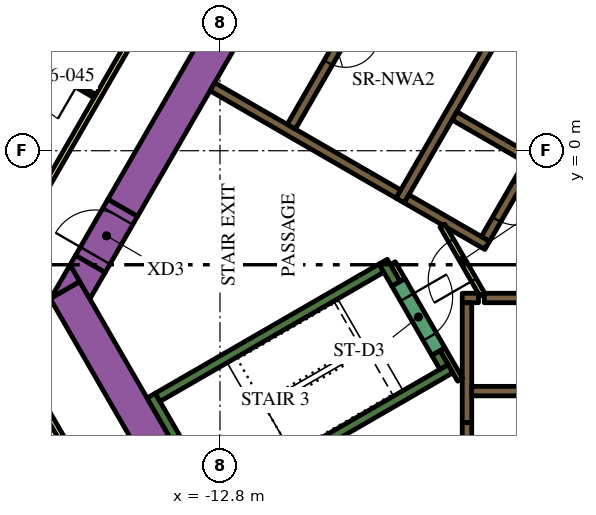
"""IFC4 building model, lengths in metres.
Left out: names, types, materials, properties, quantities, classifications, styles, units other than length and angle.
Written with IfcOpenShell. Run it as: python <this file> out.ifc"""

import sys

from ifc_helpers import new_model, si_unit, direction, frame, frame_2d, origin, place, context, subcontext, project, spatial, polyline, rectangle, outline, extrude, element, fill, save


model = new_model("IFC4")
c1 = context("Model", 3, precision=1e-05, world=origin(), true_north=direction((0.0, 1.0)))
c2 = subcontext(c1, "Body", "Model", "MODEL_VIEW")
j1 = project(units=[si_unit("LENGTHUNIT", "METRE"), si_unit("PLANEANGLEUNIT", "RADIAN")], contexts=[c1])
p1 = place(None, origin())
s1 = spatial("IfcSite", under=j1, at=p1, CompositionType="ELEMENT")
p2 = place(p1, origin())
s2 = spatial("IfcBuilding", under=s1, at=p2, CompositionType="ELEMENT")
p3 = place(p2, frame((0.0, 0.0, 83.7)))
s3 = spatial("IfcBuildingStorey", under=s2, at=p3, CompositionType="ELEMENT", Elevation=83.7)
p4 = place(p3, frame((-15.36, -1.503, 0.0), z_axis=(0.0, 0.0, 1.0), x_axis=(0.50000389221, 0.866023156604, 0.0)))
e1 = element("IfcWall", 1, at=p4, inside=s3, PredefinedType="SOLIDWALL", context=c2, shape_type="SweptSolid", body=[
    extrude(rectangle(XDim=21.0, YDim=0.9, at=frame_2d((10.5, 0.0))), origin(), (0.0, 0.0, 1.0), 3.9),
])
p5 = place(p3, frame((-12.134, -11.883, 0.0), z_axis=(0.0, 0.0, 1.0), x_axis=(-0.500005339912, 0.866022320763, 0.0)))
e2 = element("IfcWall", 2, at=p5, inside=s3, PredefinedType="SOLIDWALL", context=c2, shape_type="SweptSolid", body=[
    extrude(rectangle(XDim=9.488, YDim=0.9, at=frame_2d((4.744, 0.0))), origin(), (0.0, 0.0, 1.0), 3.9),
])
p6 = place(p3, origin())
e3 = element("IfcWall", 3, at=p6, inside=s3, PredefinedType="SOLIDWALL", context=c2, shape_type="SweptSolid", body=[
    extrude(outline(polyline([(-16.489, -3.44), (-17.251, -3.88), (-16.743, -3.0), (-16.489, -3.44)])), origin(), (0.0, 0.0, 1.0), 3.9),
])
e4 = element("IfcWall", 4, at=p6, inside=s3, PredefinedType="SOLIDWALL", context=c2, shape_type="SweptSolid", body=[
    extrude(outline(polyline([(-15.82, -3.201), (-16.223, -3.9), (-16.743, -3.0), (-16.599, -2.751), (-15.82, -3.201)])), origin(), (0.0, 0.0, 1.0), 3.9),
])
p7 = place(p3, frame((-12.885, -9.431, 0.0), z_axis=(0.0, 0.0, 1.0), x_axis=(-0.500020560727, 0.866013532718, 0.0)))
e5 = element("IfcWall", 5, at=p7, inside=s3, PredefinedType="SOLIDWALL", context=c2, shape_type="SweptSolid", body=[
    extrude(rectangle(XDim=3.45, YDim=0.25, at=frame_2d((1.725, 0.0))), origin(), (0.0, 0.0, 1.0), 3.9),
])
p8 = place(p3, frame((-14.44, -6.49, 0.0), z_axis=(0.0, 0.0, 1.0), x_axis=(0.866022966069, 0.500004222222, 0.0)))
e6 = element("IfcWall", 6, at=p8, inside=s3, PredefinedType="SOLIDWALL", context=c2, shape_type="SweptSolid", body=[
    extrude(rectangle(XDim=6.8, YDim=0.25, at=frame_2d((3.4, 0.0))), origin(), (0.0, 0.0, 1.0), 3.9),
])
p9 = place(p3, frame((-8.168, -3.503, 0.0), z_axis=(0.0, 0.0, 1.0), x_axis=(-0.499952099219, 0.866053057547, 0.0)))
e7 = element("IfcWall", 7, at=p9, inside=s3, PredefinedType="SOLIDWALL", context=c2, shape_type="SweptSolid", body=[
    extrude(rectangle(XDim=0.675, YDim=0.25, at=frame_2d((0.337, 0.0))), origin(), (0.0, 0.0, 1.0), 3.9),
])
p10 = place(p3, frame((-12.84, -9.261, 0.0), z_axis=(0.0, 0.0, 1.0), x_axis=(0.866016039709, 0.500016218704, 0.0)))
e8 = element("IfcWall", 8, at=p10, inside=s3, PredefinedType="SOLIDWALL", context=c2, shape_type="SweptSolid", body=[
    extrude(rectangle(XDim=7.05, YDim=0.25, at=frame_2d((3.525, 0.0))), origin(), (0.0, 0.0, 1.0), 3.9),
])
p11 = place(p3, frame((-6.905, -5.69, 0.0), z_axis=(0.0, 0.0, 1.0), x_axis=(-0.500402024738, 0.865793170242, 0.0)))
e9 = element("IfcWall", 9, at=p11, inside=s3, PredefinedType="SOLIDWALL", context=c2, shape_type="SweptSolid", body=[
    extrude(rectangle(XDim=0.425, YDim=0.25, at=frame_2d((0.212, 0.0))), origin(), (0.0, 0.0, 1.0), 3.9),
])
p12 = place(p3, frame((-5.845, -3.875, 0.0), z_axis=(0.0, 0.0, 1.0), x_axis=(1.0, 0.0, 0.0)))
e10 = element("IfcWall", 10, at=p12, inside=s3, PredefinedType="SOLIDWALL", context=c2, shape_type="SweptSolid", body=[
    extrude(rectangle(XDim=12.27, YDim=0.25, at=frame_2d((6.135, 0.0))), origin(), (0.0, 0.0, 1.0), 3.9),
])
p13 = place(p3, frame((-6.425, -3.875, 0.0), z_axis=(0.0, 0.0, 1.0), x_axis=(1.0, 0.0, 0.0)))
e11 = element("IfcWall", 11, at=p13, inside=s3, PredefinedType="SOLIDWALL", context=c2, shape_type="SweptSolid", body=[
    extrude(rectangle(XDim=0.428, YDim=0.25, at=frame_2d((0.214, 0.0))), origin(), (0.0, 0.0, 1.0), 3.9),
])
p14 = place(p3, frame((-6.3, -4.0, 0.0), z_axis=(0.0, 0.0, 1.0), x_axis=(0.0, -1.0, 0.0)))
e12 = element("IfcWall", 12, at=p14, inside=s3, PredefinedType="SOLIDWALL", context=c2, shape_type="SweptSolid", body=[
    extrude(rectangle(XDim=3.154, YDim=0.25, at=frame_2d((1.577, 0.0))), origin(), (0.0, 0.0, 1.0), 3.9),
])
p15 = place(p3, frame((-8.06, -1.311, 0.0), z_axis=(0.0, 0.0, 1.0), x_axis=(0.50000273126, 0.866023826885, 0.0)))
e13 = element("IfcWall", 13, at=p15, inside=s3, PredefinedType="SOLIDWALL", context=c2, shape_type="SweptSolid", body=[
    extrude(rectangle(XDim=10.33, YDim=0.25, at=frame_2d((5.165, 0.0))), origin(), (0.0, 0.0, 1.0), 3.9),
])
for number, where, z_axis, x_axis in (
    (14, (-5.369, 3.1, 0.0), (0.0, 0.0, 1.0), (0.866, -0.5, 0.0)),
    (15, (-4.724, -0.182, 0.0), (0.0, 0.0, 1.0), (-0.866, 0.5, 0.0)),
):
    element("IfcWall", number, at=place(p3, frame(where, z_axis=z_axis, x_axis=x_axis)), inside=s3, PredefinedType="SOLIDWALL", context=c2, shape_type="SweptSolid", body=[
        extrude(rectangle(XDim=2.2, YDim=0.25, at=frame_2d((1.1, 0.0))), origin(), (0.0, 0.0, 1.0), 3.9),
    ])
e16 = element("IfcWall", 16, at=p6, inside=s3, PredefinedType="SOLIDWALL", context=c2, shape_type="SweptSolid", body=[
    extrude(outline(polyline([(-5.922, -2.257), (-5.922, -2.257), (-5.705, -2.382), (-5.83, -2.598), (-6.829, -2.021), (-6.88, -1.934), (-6.88, -1.934), (-6.93, -1.963), (-7.952, -1.373), (-7.827, -1.156), (-5.922, -2.257)])), origin(), (0.0, 0.0, 1.0), 3.9),
])
p16 = place(p3, frame((-8.106, -1.14, 0.0), z_axis=(0.0, 0.0, 1.0), x_axis=(-0.866000643155, 0.500042884217, 0.0)))
e17 = element("IfcWall", 17, at=p16, inside=s3, PredefinedType="SOLIDWALL", context=c2, shape_type="SweptSolid", body=[
    extrude(rectangle(XDim=5.65, YDim=0.25, at=frame_2d((2.825, 0.0))), origin(), (0.0, 0.0, 1.0), 3.9),
])
p17 = place(p3, frame((-6.48, -6.027, 0.0), z_axis=(0.0, 0.0, 1.0), x_axis=(-0.499927229454, 0.866067413802, 0.0)))
e18 = element("IfcWall", 18, at=p17, inside=s3, PredefinedType="PARTITIONING", context=c2, shape_type="SweptSolid", body=[
    extrude(rectangle(XDim=0.929, YDim=0.15, at=frame_2d((0.464, 0.0))), origin(), (0.0, 0.0, 1.0), 3.9),
])
p18 = place(p3, frame((-8.252, -2.958, 0.0), z_axis=(0.0, 0.0, 1.0), x_axis=(0.500174715838, -0.865924508047, 0.0)))
e19 = element("IfcWall", 19, at=p18, inside=s3, PredefinedType="PARTITIONING", context=c2, shape_type="SweptSolid", body=[
    extrude(rectangle(XDim=0.514, YDim=0.15, at=frame_2d((0.257, 0.0))), origin(), (0.0, 0.0, 1.0), 2.75),
])
p19 = place(p3, frame((-6.175, -6.325, 0.0), z_axis=(0.0, 0.0, 1.0), x_axis=(1.0, 0.0, 0.0)))
e20 = element("IfcWall", 20, at=p19, inside=s3, PredefinedType="SOLIDWALL", context=c2, shape_type="SweptSolid", body=[
    extrude(rectangle(XDim=12.35, YDim=0.25, at=frame_2d((6.175, 0.0))), origin(), (0.0, 0.0, 1.0), 3.9),
])
p20 = place(p19, frame((3.205, 0.0, 0.0)))
e21 = element("IfcOpeningElement", 21, at=p20, cuts=e20, PredefinedType="OPENING", context=c2, shape_type="SweptSolid", body=[
    extrude(rectangle(XDim=0.9, YDim=2.1, at=frame_2d((0.45, 1.05))), frame((0.0, 0.135, 0.0), z_axis=(0.0, -1.0, 0.0), x_axis=(1.0, 0.0, 0.0)), (0.0, 0.0, 1.0), 0.27),
])
p21 = place(p19, frame((8.145, 0.0, 0.0)))
e22 = element("IfcOpeningElement", 22, at=p21, cuts=e20, PredefinedType="OPENING", context=c2, shape_type="SweptSolid", body=[
    extrude(rectangle(XDim=1.1, YDim=2.1, at=frame_2d((0.55, 1.05))), frame((0.0, 0.135, 0.0), z_axis=(0.0, -1.0, 0.0), x_axis=(1.0, 0.0, 0.0)), (0.0, 0.0, 1.0), 0.27),
])
p22 = place(p19, frame((10.665, 0.0, 0.0)))
e23 = element("IfcOpeningElement", 23, at=p22, cuts=e20, PredefinedType="OPENING", context=c2, shape_type="SweptSolid", body=[
    extrude(rectangle(XDim=1.1, YDim=2.1, at=frame_2d((0.55, 1.05))), frame((0.0, 0.135, 0.0), z_axis=(0.0, -1.0, 0.0), x_axis=(1.0, 0.0, 0.0)), (0.0, 0.0, 1.0), 0.27),
])
p23 = place(p3, frame((-6.008, 9.144, 0.0), z_axis=(0.0, 0.0, 1.0), x_axis=(-0.500006956611, -0.866021387346, 0.0)))
e24 = element("IfcWall", 24, at=p23, inside=s3, PredefinedType="SOLIDWALL", context=c2, shape_type="SweptSolid", body=[
    extrude(rectangle(XDim=9.83, YDim=0.25, at=frame_2d((4.915, 0.0))), origin(), (0.0, 0.0, 1.0), 3.9),
])
p24 = place(p23, frame((6.985, 0.0, 0.0)))
e25 = element("IfcOpeningElement", 25, at=p24, cuts=e24, PredefinedType="OPENING", context=c2, shape_type="SweptSolid", body=[
    extrude(rectangle(XDim=0.9, YDim=2.1, at=frame_2d((0.45, 1.05))), frame((0.0, 0.135, 0.0), z_axis=(0.0, -1.0, 0.0), x_axis=(1.0, 0.0, 0.0)), (0.0, 0.0, 1.0), 0.27),
])
p25 = place(p3, frame((-0.898, 6.194, 0.0), z_axis=(0.0, 0.0, 1.0), x_axis=(-0.499996202215, -0.866027596426, 0.0)))
e26 = element("IfcWall", 26, at=p25, inside=s3, PredefinedType="SOLIDWALL", context=c2, shape_type="SweptSolid", body=[
    extrude(rectangle(XDim=9.83, YDim=0.25, at=frame_2d((4.915, 0.0))), origin(), (0.0, 0.0, 1.0), 3.9),
])
p26 = place(p25, frame((0.585, 0.0, 0.0)))
e27 = element("IfcOpeningElement", 27, at=p26, cuts=e26, PredefinedType="OPENING", context=c2, shape_type="SweptSolid", body=[
    extrude(rectangle(XDim=1.1, YDim=2.1, at=frame_2d((0.55, 1.05))), frame((0.0, 0.135, 0.0), z_axis=(0.0, -1.0, 0.0), x_axis=(1.0, 0.0, 0.0)), (0.0, 0.0, 1.0), 0.27),
])
p27 = place(p25, frame((3.105, 0.0, 0.0)))
e28 = element("IfcOpeningElement", 28, at=p27, cuts=e26, PredefinedType="OPENING", context=c2, shape_type="SweptSolid", body=[
    extrude(rectangle(XDim=1.1, YDim=2.1, at=frame_2d((0.55, 1.05))), frame((0.0, 0.135, 0.0), z_axis=(0.0, -1.0, 0.0), x_axis=(1.0, 0.0, 0.0)), (0.0, 0.0, 1.0), 0.27),
])
p28 = place(p25, frame((5.625, 0.0, 0.0)))
e29 = element("IfcOpeningElement", 29, at=p28, cuts=e26, PredefinedType="OPENING", context=c2, shape_type="SweptSolid", body=[
    extrude(rectangle(XDim=1.1, YDim=2.1, at=frame_2d((0.55, 1.05))), frame((0.0, 0.135, 0.0), z_axis=(0.0, -1.0, 0.0), x_axis=(1.0, 0.0, 0.0)), (0.0, 0.0, 1.0), 0.27),
])
p29 = place(p25, frame((8.145, 0.0, 0.0)))
e30 = element("IfcOpeningElement", 30, at=p29, cuts=e26, PredefinedType="OPENING", context=c2, shape_type="SweptSolid", body=[
    extrude(rectangle(XDim=1.1, YDim=2.1, at=frame_2d((0.55, 1.05))), frame((0.0, 0.135, 0.0), z_axis=(0.0, -1.0, 0.0), x_axis=(1.0, 0.0, 0.0)), (0.0, 0.0, 1.0), 0.27),
])
p30 = place(p3, frame((-8.103, -3.466, 0.0), z_axis=(0.0, 0.0, 1.0), x_axis=(0.500078061341, -0.865980330357, 0.0)))
e31 = element("IfcWall", 31, at=p30, inside=s3, PredefinedType="SOLIDWALL", context=c2, shape_type="SweptSolid", body=[
    extrude(rectangle(XDim=2.1, YDim=0.4, at=frame_2d((1.05, 0.0))), origin(), (0.0, 0.0, 1.0), 3.9),
])
p31 = place(p30, frame((0.45, 0.0, 0.0)))
e32 = element("IfcOpeningElement", 32, at=p31, cuts=e31, PredefinedType="OPENING", context=c2, shape_type="SweptSolid", body=[
    extrude(rectangle(XDim=1.2, YDim=2.1, at=frame_2d((0.6, 1.05))), frame((0.0, 0.21, 0.0), z_axis=(0.0, -1.0, 0.0), x_axis=(1.0, 0.0, 0.0)), (0.0, 0.0, 1.0), 0.42),
])
p32 = place(p3, frame((-6.3, -7.154, 0.0), z_axis=(0.0, 0.0, 1.0), x_axis=(0.0, -1.0, 0.0)))
e33 = element("IfcWall", 33, at=p32, inside=s3, PredefinedType="SOLIDWALL", context=c2, shape_type="SweptSolid", body=[
    extrude(rectangle(XDim=1.8, YDim=0.25, at=frame_2d((0.9, 0.0))), origin(), (0.0, 0.0, 1.0), 3.9),
])
p33 = place(p32, frame((0.45, 0.0, 0.0)))
e34 = element("IfcOpeningElement", 34, at=p33, cuts=e33, PredefinedType="OPENING", context=c2, shape_type="SweptSolid", body=[
    extrude(rectangle(XDim=0.9, YDim=2.1, at=frame_2d((0.45, 1.05))), frame((0.0, 0.135, 0.0), z_axis=(0.0, -1.0, 0.0), x_axis=(1.0, 0.0, 0.0)), (0.0, 0.0, 1.0), 0.27),
])
p34 = place(p3, frame((-5.895, -3.79, 0.0), z_axis=(0.0, 0.0, 1.0), x_axis=(-0.49994051562, 0.866059744384, 0.0)))
e35 = element("IfcWall", 35, at=p34, inside=s3, PredefinedType="PARTITIONING", context=c2, shape_type="SweptSolid", body=[
    extrude(rectangle(XDim=2.1, YDim=0.15, at=frame_2d((1.05, 0.0))), origin(), (0.0, 0.0, 1.0), 2.75),
])
p35 = place(p34, frame((0.45, 0.0, 0.0)))
e36 = element("IfcOpeningElement", 36, at=p35, cuts=e35, PredefinedType="OPENING", context=c2, shape_type="SweptSolid", body=[
    extrude(rectangle(XDim=1.2, YDim=2.1, at=frame_2d((0.6, 1.05))), frame((0.0, 0.085, 0.0), z_axis=(0.0, -1.0, 0.0), x_axis=(1.0, 0.0, 0.0)), (0.0, 0.0, 1.0), 0.17),
])
p36 = place(p3, frame((-16.209, -2.976, 0.0), z_axis=(0.0, 0.0, 1.0), x_axis=(0.499954529098, 0.86605165483, 0.0)))
e37 = element("IfcWall", 37, at=p36, inside=s3, PredefinedType="SOLIDWALL", context=c2, shape_type="SweptSolid", body=[
    extrude(rectangle(XDim=1.7, YDim=0.9, at=frame_2d((0.85, 0.0))), origin(), (0.0, 0.0, 1.0), 3.9),
])
p37 = place(p36, frame((0.25, 0.0, 0.0)))
e38 = element("IfcOpeningElement", 38, at=p37, cuts=e37, PredefinedType="OPENING", context=c2, shape_type="SweptSolid", body=[
    extrude(rectangle(XDim=1.2, YDim=2.1, at=frame_2d((0.6, 1.05))), frame((0.0, 0.46, 0.0), z_axis=(0.0, -1.0, 0.0), x_axis=(1.0, 0.0, 0.0)), (0.0, 0.0, 1.0), 0.92),
])
p38 = place(p3, frame((-19.081, -3.9, 0.0), z_axis=(0.0, 0.0, 1.0), x_axis=(0.499998313975, 0.866026377209, 0.0)))
e39 = element("IfcWall", 39, at=p38, inside=s3, PredefinedType="PARTITIONING", context=c2, shape_type="SweptSolid", body=[
    extrude(rectangle(XDim=25.766, YDim=0.15, at=frame_2d((12.883, 0.0))), origin(), (0.0, 0.0, 1.0), 2.75),
])
p39 = place(p38, frame((19.306, 0.0, 0.0)))
e40 = element("IfcOpeningElement", 40, at=p39, cuts=e39, PredefinedType="OPENING", context=c2, shape_type="SweptSolid", body=[
    extrude(rectangle(XDim=1.0, YDim=2.1, at=frame_2d((0.5, 1.05))), frame((0.0, 0.085, 0.0), z_axis=(0.0, -1.0, 0.0), x_axis=(1.0, 0.0, 0.0)), (0.0, 0.0, 1.0), 0.17),
])
p40 = place(p38, frame((18.0, 0.0, 0.0)))
e41 = element("IfcOpeningElement", 41, at=p40, cuts=e39, PredefinedType="OPENING", context=c2, shape_type="SweptSolid", body=[
    extrude(rectangle(XDim=1.0, YDim=2.1, at=frame_2d((0.5, 1.05))), frame((0.0, 0.085, 0.0), z_axis=(0.0, -1.0, 0.0), x_axis=(1.0, 0.0, 0.0)), (0.0, 0.0, 1.0), 0.17),
])
p41 = place(p38, frame((10.874, 0.0, 0.0)))
e42 = element("IfcOpeningElement", 42, at=p41, cuts=e39, PredefinedType="OPENING", context=c2, shape_type="SweptSolid", body=[
    extrude(rectangle(XDim=0.9, YDim=2.1, at=frame_2d((0.45, 1.05))), frame((0.0, 0.085, 0.0), z_axis=(0.0, -1.0, 0.0), x_axis=(1.0, 0.0, 0.0)), (0.0, 0.0, 1.0), 0.17),
])
p42 = place(p38, frame((8.548, 0.0, 0.0)))
e43 = element("IfcOpeningElement", 43, at=p42, cuts=e39, PredefinedType="OPENING", context=c2, shape_type="SweptSolid", body=[
    extrude(rectangle(XDim=1.1, YDim=2.1, at=frame_2d((0.55, 1.05))), frame((0.0, 0.085, 0.0), z_axis=(0.0, -1.0, 0.0), x_axis=(1.0, 0.0, 0.0)), (0.0, 0.0, 1.0), 0.17),
])
p43 = place(p38, frame((0.18, 0.0, 0.0)))
e44 = element("IfcOpeningElement", 44, at=p43, cuts=e39, PredefinedType="OPENING", context=c2, shape_type="SweptSolid", body=[
    extrude(rectangle(XDim=1.0, YDim=2.1, at=frame_2d((0.5, 1.05))), frame((0.0, 0.085, 0.0), z_axis=(0.0, -1.0, 0.0), x_axis=(1.0, 0.0, 0.0)), (0.0, 0.0, 1.0), 0.17),
])
p44 = place(p3, frame((-16.412, -8.523, 0.0), z_axis=(0.0, 0.0, 1.0), x_axis=(-0.500001929737, 0.866024289647, 0.0)))
e45 = element("IfcWall", 45, at=p44, inside=s3, PredefinedType="PARTITIONING", context=c2, shape_type="SweptSolid", body=[
    extrude(rectangle(XDim=5.268, YDim=0.15, at=frame_2d((2.634, 0.0))), origin(), (0.0, 0.0, 1.0), 2.75),
])
p45 = place(p3, frame((-26.591, -3.122, 0.0), z_axis=(0.0, 0.0, 1.0), x_axis=(0.893766213273, -0.448533115847, 0.0)))
e46 = element("IfcWall", 46, at=p45, inside=s3, PredefinedType="PARTITIONING", context=c2, shape_type="SweptSolid", body=[
    extrude(rectangle(XDim=10.875, YDim=0.15, at=frame_2d((5.438, 0.0))), origin(), (0.0, 0.0, 1.0), 2.75),
])
p46 = place(p3, frame((-16.087, 1.436, 0.0), z_axis=(0.0, 0.0, 1.0), x_axis=(-0.866034573852, 0.49998411664, 0.0)))
e47 = element("IfcWall", 47, at=p46, inside=s3, PredefinedType="PARTITIONING", context=c2, shape_type="SweptSolid", body=[
    extrude(rectangle(XDim=2.8, YDim=0.1, at=frame_2d((1.4, 0.0))), origin(), (0.0, 0.0, 1.0), 2.75),
])
p47 = place(p46, frame((0.55, 0.0, 0.0)))
e48 = element("IfcOpeningElement", 48, at=p47, cuts=e47, PredefinedType="OPENING", context=c2, shape_type="SweptSolid", body=[
    extrude(rectangle(XDim=1.0, YDim=2.1, at=frame_2d((0.5, 1.05))), frame((0.0, 0.06, 0.0), z_axis=(0.0, -1.0, 0.0), x_axis=(1.0, 0.0, 0.0)), (0.0, 0.0, 1.0), 0.12),
])
p48 = place(p24, origin())
e49 = element("IfcDoor", 49, at=p48, inside=s3, OperationType="SINGLE_SWING_LEFT", PredefinedType="DOOR", context=c2, shape_type="SweptSolid", body=[
    extrude(rectangle(XDim=0.9, YDim=2.1, at=frame_2d((0.45, 1.05))), frame((0.0, 0.025, 0.0), z_axis=(0.0, -1.0, 0.0), x_axis=(1.0, 0.0, 0.0)), (0.0, 0.0, 1.0), 0.05),
])
fill(e25, e49)
p49 = place(p29, origin())
e50 = element("IfcDoor", 50, at=p49, inside=s3, OperationType="DOUBLE_DOOR_SLIDING", PredefinedType="DOOR", context=c2, shape_type="SweptSolid", body=[
    extrude(rectangle(XDim=1.1, YDim=2.1, at=frame_2d((0.55, 1.05))), frame((0.0, 0.025, 0.0), z_axis=(0.0, -1.0, 0.0), x_axis=(1.0, 0.0, 0.0)), (0.0, 0.0, 1.0), 0.05),
])
fill(e30, e50)
p50 = place(p31, origin())
e51 = element("IfcDoor", 51, at=p50, inside=s3, OperationType="SINGLE_SWING_LEFT", PredefinedType="DOOR", context=c2, shape_type="SweptSolid", body=[
    extrude(rectangle(XDim=1.2, YDim=2.1, at=frame_2d((0.6, 1.05))), frame((0.0, 0.025, 0.0), z_axis=(0.0, -1.0, 0.0), x_axis=(1.0, 0.0, 0.0)), (0.0, 0.0, 1.0), 0.05),
])
fill(e32, e51)
p51 = place(p35, origin())
e52 = element("IfcDoor", 52, at=p51, inside=s3, OperationType="SINGLE_SWING_LEFT", PredefinedType="DOOR", context=c2, shape_type="SweptSolid", body=[
    extrude(rectangle(XDim=1.2, YDim=2.1, at=frame_2d((0.6, 1.05))), frame((0.0, 0.025, 0.0), z_axis=(0.0, -1.0, 0.0), x_axis=(1.0, 0.0, 0.0)), (0.0, 0.0, 1.0), 0.05),
])
fill(e36, e52)
p52 = place(p37, origin())
e53 = element("IfcDoor", 53, at=p52, inside=s3, OperationType="SINGLE_SWING_LEFT", PredefinedType="DOOR", context=c2, shape_type="SweptSolid", body=[
    extrude(rectangle(XDim=1.2, YDim=2.1, at=frame_2d((0.6, 1.05))), frame((0.0, 0.025, 0.0), z_axis=(0.0, -1.0, 0.0), x_axis=(1.0, 0.0, 0.0)), (0.0, 0.0, 1.0), 0.05),
])
fill(e38, e53)
p53 = place(p47, origin())
e54 = element("IfcDoor", 54, at=p53, inside=s3, OperationType="SINGLE_SWING_RIGHT", PredefinedType="DOOR", context=c2, shape_type="SweptSolid", body=[
    extrude(rectangle(XDim=1.0, YDim=2.1, at=frame_2d((0.5, 1.05))), frame((0.0, 0.025, 0.0), z_axis=(0.0, -1.0, 0.0), x_axis=(1.0, 0.0, 0.0)), (0.0, 0.0, 1.0), 0.05),
])
fill(e48, e54)
save(model, sys.argv[1])
